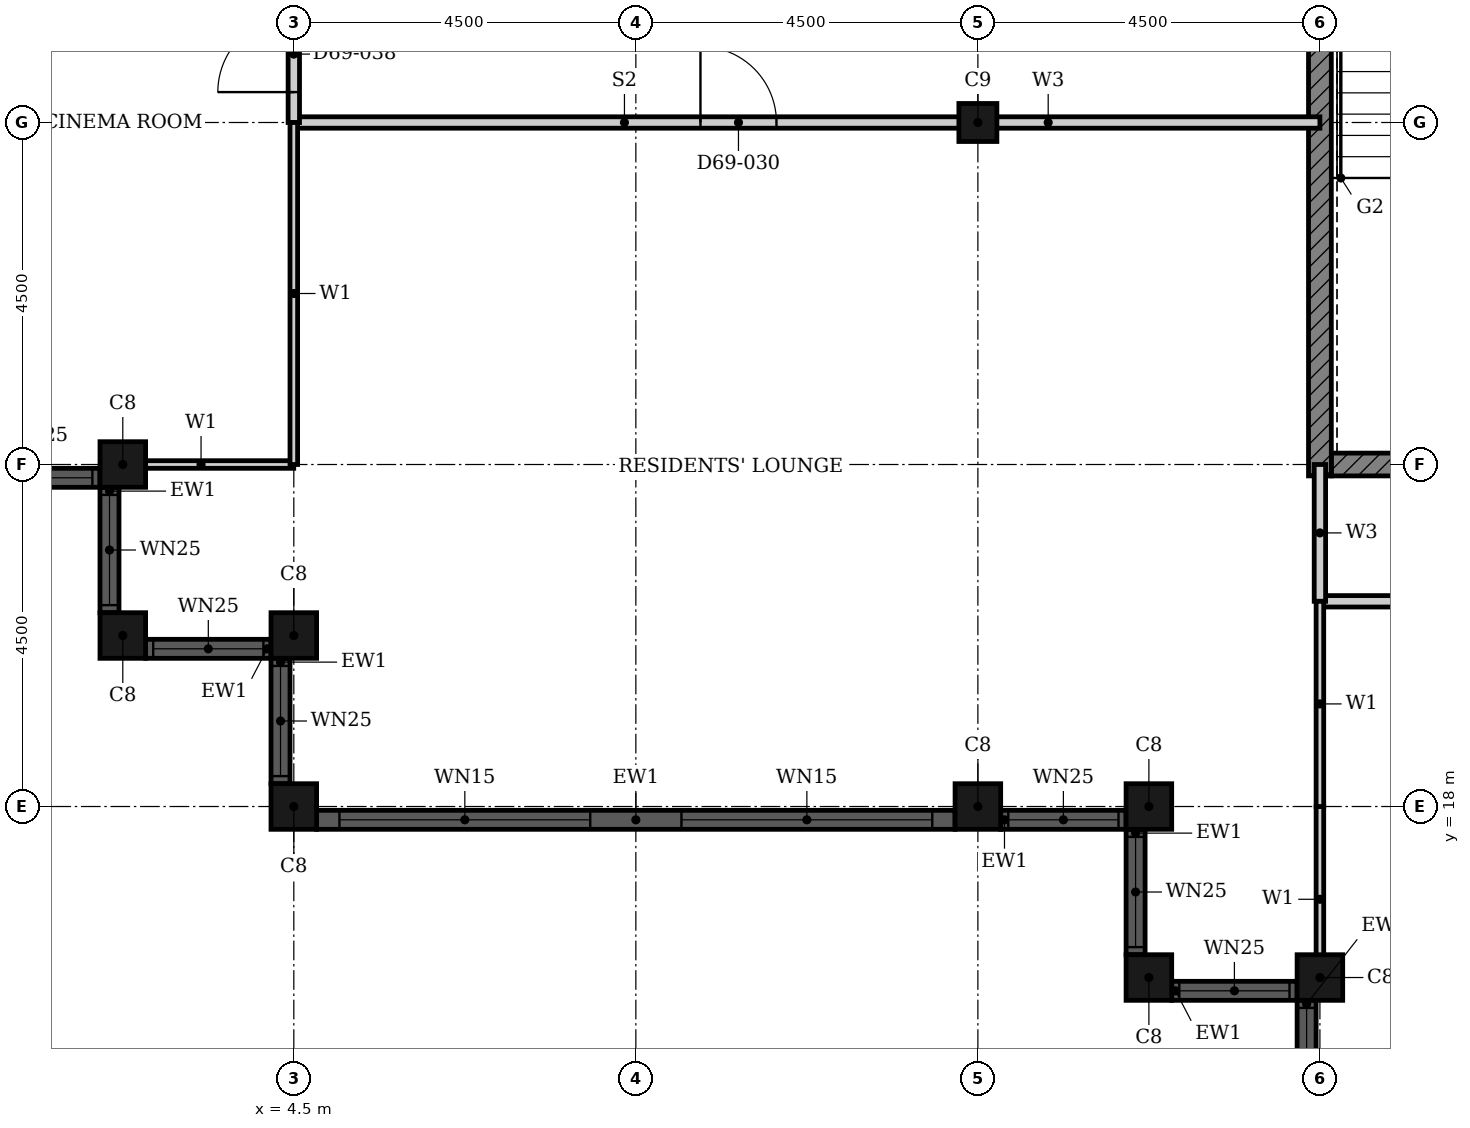
"""IFC4 building model, lengths in metres.
Left out: names, types, materials, properties, quantities, classifications, styles, units other than length and angle.
Written with IfcOpenShell. Run it as: python <this file> out.ifc"""

import sys

from ifc_helpers import new_model, si_unit, direction, frame, frame_2d, origin, origin_2d, place, context, subcontext, project, spatial, rectangle, hollow_rectangle, extrude, element, fill, save


model = new_model("IFC4")
c1 = context("Model", 3, precision=1e-05, world=origin(), true_north=direction((0.0, 1.0)))
c2 = subcontext(c1, "Body", "Model", "MODEL_VIEW")
j1 = project(units=[si_unit("LENGTHUNIT", "METRE"), si_unit("PLANEANGLEUNIT", "RADIAN")], contexts=[c1])
p1 = place(None, origin())
s1 = spatial("IfcSite", under=j1, at=p1, CompositionType="ELEMENT")
p2 = place(p1, origin())
s2 = spatial("IfcBuilding", under=s1, at=p2, CompositionType="ELEMENT")
p3 = place(p2, frame((0.0, 0.0, 271.2)))
s3 = spatial("IfcBuildingStorey", under=s2, at=p3, CompositionType="ELEMENT", Elevation=271.2)
for number, where, z_axis, x_axis in (
    (1, (15.75, 18.0, 0.0), (0.0, 0.0, 1.0), (1.0, 0.0, 0.0)),
    (2, (15.75, 15.75, 0.0), (0.0, 0.0, 1.0), (1.0, 0.0, 0.0)),
    (3, (18.0, 15.75, 0.0), (0.0, 0.0, 1.0), (1.0, 0.0, 0.0)),
    (4, (2.25, 22.5, 0.0), (0.0, 0.0, 1.0), (1.0, 0.0, 0.0)),
    (5, (2.25, 20.25, 0.0), (0.0, 0.0, 1.0), (1.0, 0.0, 0.0)),
    (6, (4.5, 20.25, 0.0), (0.0, 0.0, 1.0), (1.0, 0.0, 0.0)),
    (7, (4.5, 18.0, 0.0), (0.0, 0.0, 1.0), (1.0, 0.0, 0.0)),
    (8, (13.5, 18.0, 0.0), (0.0, 0.0, 1.0), (1.0, 0.0, 0.0)),
):
    element("IfcColumn", number, at=place(p3, frame(where, z_axis=z_axis, x_axis=x_axis)), inside=s3, PredefinedType="COLUMN", context=c2, shape_type="SweptSolid", body=[
        extrude(hollow_rectangle(XDim=0.6, YDim=0.6, WallThickness=0.02, at=origin_2d()), origin(), (0.0, 0.0, 1.0), 3.7),
    ])
p4 = place(p3, frame((13.5, 27.0, 0.0), z_axis=(0.0, 0.0, 1.0), x_axis=(1.0, 0.0, 0.0)))
e9 = element("IfcColumn", 9, at=p4, inside=s3, PredefinedType="COLUMN", context=c2, shape_type="SweptSolid", body=[
    extrude(hollow_rectangle(XDim=0.5, YDim=0.5, WallThickness=0.016, InnerFilletRadius=0.032, OuterFilletRadius=0.048, at=origin_2d()), origin(), (0.0, 0.0, 1.0), 3.7),
])
p5 = place(p3, frame((15.575, 17.7, 0.0), z_axis=(0.0, 0.0, 1.0), x_axis=(0.0, -1.0, 0.0)))
e10 = element("IfcWall", 10, at=p5, inside=s3, PredefinedType="SOLIDWALL", context=c2, shape_type="SweptSolid", body=[
    extrude(rectangle(XDim=1.65, YDim=0.25, at=frame_2d((0.825, 0.0))), origin(), (0.0, 0.0, 1.0), 3.7),
])
p6 = place(p5, frame((0.1, 0.0, 0.9)))
e11 = element("IfcOpeningElement", 11, at=p6, cuts=e10, PredefinedType="OPENING", context=c2, shape_type="SweptSolid", body=[
    extrude(rectangle(XDim=1.45, YDim=1.85, at=frame_2d((0.725, 0.925))), frame((0.0, 0.135, 0.0), z_axis=(0.0, -1.0, 0.0), x_axis=(1.0, 0.0, 0.0)), (0.0, 0.0, 1.0), 0.27),
])
p7 = place(p3, frame((16.05, 15.575, 0.0), z_axis=(0.0, 0.0, 1.0), x_axis=(1.0, 0.0, 0.0)))
e12 = element("IfcWall", 12, at=p7, inside=s3, PredefinedType="SOLIDWALL", context=c2, shape_type="SweptSolid", body=[
    extrude(rectangle(XDim=1.65, YDim=0.25, at=frame_2d((0.825, 0.0))), origin(), (0.0, 0.0, 1.0), 3.7),
])
p8 = place(p7, frame((0.1, 0.0, 0.9)))
e13 = element("IfcOpeningElement", 13, at=p8, cuts=e12, PredefinedType="OPENING", context=c2, shape_type="SweptSolid", body=[
    extrude(rectangle(XDim=1.45, YDim=1.85, at=frame_2d((0.725, 0.925))), frame((0.0, 0.135, 0.0), z_axis=(0.0, -1.0, 0.0), x_axis=(1.0, 0.0, 0.0)), (0.0, 0.0, 1.0), 0.27),
])
p9 = place(p3, frame((17.825, 15.45, 0.0), z_axis=(0.0, 0.0, 1.0), x_axis=(0.0, -1.0, 0.0)))
e14 = element("IfcWall", 14, at=p9, inside=s3, PredefinedType="SOLIDWALL", context=c2, shape_type="SweptSolid", body=[
    extrude(rectangle(XDim=1.65, YDim=0.25, at=frame_2d((0.825, 0.0))), origin(), (0.0, 0.0, 1.0), 3.7),
])
p10 = place(p9, frame((0.1, 0.0, 0.9)))
e15 = element("IfcOpeningElement", 15, at=p10, cuts=e14, PredefinedType="OPENING", context=c2, shape_type="SweptSolid", body=[
    extrude(rectangle(XDim=1.45, YDim=1.85, at=frame_2d((0.725, 0.925))), frame((0.0, 0.135, 0.0), z_axis=(0.0, -1.0, 0.0), x_axis=(1.0, 0.0, 0.0)), (0.0, 0.0, 1.0), 0.27),
])
p11 = place(p3, frame((0.3, 22.325, 0.0), z_axis=(0.0, 0.0, 1.0), x_axis=(1.0, 0.0, 0.0)))
e16 = element("IfcWall", 16, at=p11, inside=s3, PredefinedType="SOLIDWALL", context=c2, shape_type="SweptSolid", body=[
    extrude(rectangle(XDim=1.65, YDim=0.25, at=frame_2d((0.825, 0.0))), origin(), (0.0, 0.0, 1.0), 3.7),
])
p12 = place(p11, frame((0.1, 0.0, 0.9)))
e17 = element("IfcOpeningElement", 17, at=p12, cuts=e16, PredefinedType="OPENING", context=c2, shape_type="SweptSolid", body=[
    extrude(rectangle(XDim=1.45, YDim=1.85, at=frame_2d((0.725, 0.925))), frame((0.0, 0.135, 0.0), z_axis=(0.0, -1.0, 0.0), x_axis=(1.0, 0.0, 0.0)), (0.0, 0.0, 1.0), 0.27),
])
p13 = place(p3, frame((2.075, 22.2, 0.0), z_axis=(0.0, 0.0, 1.0), x_axis=(0.0, -1.0, 0.0)))
e18 = element("IfcWall", 18, at=p13, inside=s3, PredefinedType="SOLIDWALL", context=c2, shape_type="SweptSolid", body=[
    extrude(rectangle(XDim=1.65, YDim=0.25, at=frame_2d((0.825, 0.0))), origin(), (0.0, 0.0, 1.0), 3.7),
])
p14 = place(p13, frame((0.1, 0.0, 0.9)))
e19 = element("IfcOpeningElement", 19, at=p14, cuts=e18, PredefinedType="OPENING", context=c2, shape_type="SweptSolid", body=[
    extrude(rectangle(XDim=1.45, YDim=1.85, at=frame_2d((0.725, 0.925))), frame((0.0, 0.135, 0.0), z_axis=(0.0, -1.0, 0.0), x_axis=(1.0, 0.0, 0.0)), (0.0, 0.0, 1.0), 0.27),
])
p15 = place(p3, frame((2.55, 20.075, 0.0), z_axis=(0.0, 0.0, 1.0), x_axis=(1.0, 0.0, 0.0)))
e20 = element("IfcWall", 20, at=p15, inside=s3, PredefinedType="SOLIDWALL", context=c2, shape_type="SweptSolid", body=[
    extrude(rectangle(XDim=1.65, YDim=0.25, at=frame_2d((0.825, 0.0))), origin(), (0.0, 0.0, 1.0), 3.7),
])
p16 = place(p15, frame((0.1, 0.0, 0.9)))
e21 = element("IfcOpeningElement", 21, at=p16, cuts=e20, PredefinedType="OPENING", context=c2, shape_type="SweptSolid", body=[
    extrude(rectangle(XDim=1.45, YDim=1.85, at=frame_2d((0.725, 0.925))), frame((0.0, 0.135, 0.0), z_axis=(0.0, -1.0, 0.0), x_axis=(1.0, 0.0, 0.0)), (0.0, 0.0, 1.0), 0.27),
])
p17 = place(p3, frame((4.325, 19.95, 0.0), z_axis=(0.0, 0.0, 1.0), x_axis=(0.0, -1.0, 0.0)))
e22 = element("IfcWall", 22, at=p17, inside=s3, PredefinedType="SOLIDWALL", context=c2, shape_type="SweptSolid", body=[
    extrude(rectangle(XDim=1.65, YDim=0.25, at=frame_2d((0.825, 0.0))), origin(), (0.0, 0.0, 1.0), 3.7),
])
p18 = place(p17, frame((0.1, 0.0, 0.9)))
e23 = element("IfcOpeningElement", 23, at=p18, cuts=e22, PredefinedType="OPENING", context=c2, shape_type="SweptSolid", body=[
    extrude(rectangle(XDim=1.45, YDim=1.85, at=frame_2d((0.725, 0.925))), frame((0.0, 0.135, 0.0), z_axis=(0.0, -1.0, 0.0), x_axis=(1.0, 0.0, 0.0)), (0.0, 0.0, 1.0), 0.27),
])
p19 = place(p3, frame((4.8, 17.825, 0.0), z_axis=(0.0, 0.0, 1.0), x_axis=(1.0, 0.0, 0.0)))
e24 = element("IfcWall", 24, at=p19, inside=s3, PredefinedType="SOLIDWALL", context=c2, shape_type="SweptSolid", body=[
    extrude(rectangle(XDim=8.4, YDim=0.25, at=frame_2d((4.2, 0.0))), origin(), (0.0, 0.0, 1.0), 3.7),
])
p20 = place(p19, frame((0.3, 0.0, 0.45)))
e25 = element("IfcOpeningElement", 25, at=p20, cuts=e24, PredefinedType="OPENING", context=c2, shape_type="SweptSolid", body=[
    extrude(rectangle(XDim=3.3, YDim=2.3, at=frame_2d((1.65, 1.15))), frame((0.0, 0.135, 0.0), z_axis=(0.0, -1.0, 0.0), x_axis=(1.0, 0.0, 0.0)), (0.0, 0.0, 1.0), 0.27),
])
p21 = place(p19, frame((4.8, 0.0, 0.45)))
e26 = element("IfcOpeningElement", 26, at=p21, cuts=e24, PredefinedType="OPENING", context=c2, shape_type="SweptSolid", body=[
    extrude(rectangle(XDim=3.3, YDim=2.3, at=frame_2d((1.65, 1.15))), frame((0.0, 0.135, 0.0), z_axis=(0.0, -1.0, 0.0), x_axis=(1.0, 0.0, 0.0)), (0.0, 0.0, 1.0), 0.27),
])
p22 = place(p3, frame((13.8, 17.825, 0.0), z_axis=(0.0, 0.0, 1.0), x_axis=(1.0, 0.0, 0.0)))
e27 = element("IfcWall", 27, at=p22, inside=s3, PredefinedType="SOLIDWALL", context=c2, shape_type="SweptSolid", body=[
    extrude(rectangle(XDim=1.65, YDim=0.25, at=frame_2d((0.825, 0.0))), origin(), (0.0, 0.0, 1.0), 3.7),
])
p23 = place(p22, frame((0.1, 0.0, 0.9)))
e28 = element("IfcOpeningElement", 28, at=p23, cuts=e27, PredefinedType="OPENING", context=c2, shape_type="SweptSolid", body=[
    extrude(rectangle(XDim=1.45, YDim=1.85, at=frame_2d((0.725, 0.925))), frame((0.0, 0.135, 0.0), z_axis=(0.0, -1.0, 0.0), x_axis=(1.0, 0.0, 0.0)), (0.0, 0.0, 1.0), 0.27),
])
p24 = place(p3, frame((18.15, 22.5, 0.0), z_axis=(0.0, 0.0, 1.0), x_axis=(1.0, 0.0, 0.0)))
e29 = element("IfcWall", 29, at=p24, inside=s3, PredefinedType="SHEAR", context=c2, shape_type="SweptSolid", body=[
    extrude(rectangle(XDim=4.225, YDim=0.3, at=frame_2d((2.113, 0.0))), origin(), (0.0, 0.0, 1.0), 3.4),
])
p25 = place(p3, frame((18.0, 22.35, 0.0), z_axis=(0.0, 0.0, 1.0), x_axis=(0.0, 1.0, 0.0)))
e30 = element("IfcWall", 30, at=p25, inside=s3, PredefinedType="SHEAR", context=c2, shape_type="SweptSolid", body=[
    extrude(rectangle(XDim=9.3, YDim=0.3, at=frame_2d((4.65, 0.0))), origin(), (0.0, 0.0, 1.0), 3.4),
])
p26 = place(p3, frame((18.0, 20.7, 0.0), z_axis=(0.0, 0.0, 1.0), x_axis=(1.0, 0.0, 0.0)))
e31 = element("IfcWall", 31, at=p26, inside=s3, PredefinedType="PARTITIONING", context=c2, shape_type="SweptSolid", body=[
    extrude(rectangle(XDim=13.5, YDim=0.15, at=frame_2d((6.75, 0.0))), origin(), (0.0, 0.0, 1.0), 3.4),
])
p27 = place(p26, frame((6.25, 0.0, 0.0)))
e32 = element("IfcOpeningElement", 32, at=p27, cuts=e31, PredefinedType="OPENING", context=c2, shape_type="SweptSolid", body=[
    extrude(rectangle(XDim=1.0, YDim=2.1, at=frame_2d((0.5, 1.05))), frame((0.0, 0.085, 0.0), z_axis=(0.0, -1.0, 0.0), x_axis=(1.0, 0.0, 0.0)), (0.0, 0.0, 1.0), 0.17),
])
p28 = place(p3, frame((4.5, 27.0, 0.0), z_axis=(0.0, 0.0, 1.0), x_axis=(1.0, 0.0, 0.0)))
e33 = element("IfcWall", 33, at=p28, inside=s3, PredefinedType="PARTITIONING", context=c2, shape_type="SweptSolid", body=[
    extrude(rectangle(XDim=13.5, YDim=0.15, at=frame_2d((6.75, 0.0))), origin(), (0.0, 0.0, 1.0), 2.68),
])
p29 = place(p28, frame((5.35, 0.0, 0.0)))
e34 = element("IfcOpeningElement", 34, at=p29, cuts=e33, PredefinedType="OPENING", context=c2, shape_type="SweptSolid", body=[
    extrude(rectangle(XDim=1.0, YDim=2.1, at=frame_2d((0.5, 1.05))), frame((0.0, 0.085, 0.0), z_axis=(0.0, -1.0, 0.0), x_axis=(1.0, 0.0, 0.0)), (0.0, 0.0, 1.0), 0.17),
])
p30 = place(p3, frame((18.0, 20.7, 0.0), z_axis=(0.0, 0.0, 1.0), x_axis=(0.0, 1.0, 0.0)))
e35 = element("IfcWall", 35, at=p30, inside=s3, PredefinedType="PARTITIONING", context=c2, shape_type="SweptSolid", body=[
    extrude(rectangle(XDim=1.8, YDim=0.15, at=frame_2d((0.9, 0.0))), origin(), (0.0, 0.0, 1.0), 3.4),
])
p31 = place(p3, frame((4.5, 27.0, 0.0), z_axis=(0.0, 0.0, 1.0), x_axis=(0.0, 1.0, 0.0)))
e36 = element("IfcWall", 36, at=p31, inside=s3, PredefinedType="PARTITIONING", context=c2, shape_type="SweptSolid", body=[
    extrude(rectangle(XDim=1.8, YDim=0.15, at=frame_2d((0.9, 0.0))), origin(), (0.0, 0.0, 1.0), 3.4),
])
p32 = place(p31, frame((0.4, 0.0, 0.0)))
e37 = element("IfcOpeningElement", 37, at=p32, cuts=e36, PredefinedType="OPENING", context=c2, shape_type="SweptSolid", body=[
    extrude(rectangle(XDim=1.0, YDim=2.1, at=frame_2d((0.5, 1.05))), frame((0.0, 0.085, 0.0), z_axis=(0.0, -1.0, 0.0), x_axis=(1.0, 0.0, 0.0)), (0.0, 0.0, 1.0), 0.17),
])
p33 = place(p3, frame((2.06, 22.5, 0.0), z_axis=(0.0, 0.0, 1.0), x_axis=(1.0, 0.0, 0.0)))
e38 = element("IfcWall", 38, at=p33, inside=s3, PredefinedType="PARTITIONING", context=c2, shape_type="SweptSolid", body=[
    extrude(rectangle(XDim=2.439, YDim=0.1, at=frame_2d((1.219, 0.0))), origin(), (0.0, 0.0, 1.0), 2.68),
])
p34 = place(p3, frame((18.0, 15.56, 0.0), z_axis=(0.0, 0.0, 1.0), x_axis=(0.0, 1.0, 0.0)))
e39 = element("IfcWall", 39, at=p34, inside=s3, PredefinedType="PARTITIONING", context=c2, shape_type="SweptSolid", body=[
    extrude(rectangle(XDim=2.439, YDim=0.1, at=frame_2d((1.219, 0.0))), origin(), (0.0, 0.0, 1.0), 3.4),
])
p35 = place(p3, frame((18.0, 18.0, 0.0), z_axis=(0.0, 0.0, 1.0), x_axis=(0.0, 1.0, 0.0)))
e40 = element("IfcWall", 40, at=p35, inside=s3, PredefinedType="PARTITIONING", context=c2, shape_type="SweptSolid", body=[
    extrude(rectangle(XDim=2.7, YDim=0.1, at=frame_2d((1.35, 0.0))), origin(), (0.0, 0.0, 1.0), 3.4),
])
p36 = place(p3, frame((4.5, 22.5, 0.0), z_axis=(0.0, 0.0, 1.0), x_axis=(0.0, 1.0, 0.0)))
e41 = element("IfcWall", 41, at=p36, inside=s3, PredefinedType="PARTITIONING", context=c2, shape_type="SweptSolid", body=[
    extrude(rectangle(XDim=4.5, YDim=0.1, at=frame_2d((2.25, 0.0))), origin(), (0.0, 0.0, 1.0), 3.4),
])
p37 = place(p6, origin())
e42 = element("IfcWindow", 42, at=p37, inside=s3, PartitioningType="SINGLE_PANEL", PredefinedType="WINDOW", context=c2, shape_type="SweptSolid", body=[
    extrude(rectangle(XDim=1.45, YDim=1.85, at=frame_2d((0.725, 0.925))), frame((0.0, 0.03, 0.0), z_axis=(0.0, -1.0, 0.0), x_axis=(1.0, 0.0, 0.0)), (0.0, 0.0, 1.0), 0.06),
])
fill(e11, e42)
p38 = place(p8, origin())
e43 = element("IfcWindow", 43, at=p38, inside=s3, PartitioningType="SINGLE_PANEL", PredefinedType="WINDOW", context=c2, shape_type="SweptSolid", body=[
    extrude(rectangle(XDim=1.45, YDim=1.85, at=frame_2d((0.725, 0.925))), frame((0.0, 0.03, 0.0), z_axis=(0.0, -1.0, 0.0), x_axis=(1.0, 0.0, 0.0)), (0.0, 0.0, 1.0), 0.06),
])
fill(e13, e43)
p39 = place(p10, origin())
e44 = element("IfcWindow", 44, at=p39, inside=s3, PartitioningType="SINGLE_PANEL", PredefinedType="WINDOW", context=c2, shape_type="SweptSolid", body=[
    extrude(rectangle(XDim=1.45, YDim=1.85, at=frame_2d((0.725, 0.925))), frame((0.0, 0.03, 0.0), z_axis=(0.0, -1.0, 0.0), x_axis=(1.0, 0.0, 0.0)), (0.0, 0.0, 1.0), 0.06),
])
fill(e15, e44)
p40 = place(p12, origin())
e45 = element("IfcWindow", 45, at=p40, inside=s3, PartitioningType="SINGLE_PANEL", PredefinedType="WINDOW", context=c2, shape_type="SweptSolid", body=[
    extrude(rectangle(XDim=1.45, YDim=1.85, at=frame_2d((0.725, 0.925))), frame((0.0, 0.03, 0.0), z_axis=(0.0, -1.0, 0.0), x_axis=(1.0, 0.0, 0.0)), (0.0, 0.0, 1.0), 0.06),
])
fill(e17, e45)
p41 = place(p14, origin())
e46 = element("IfcWindow", 46, at=p41, inside=s3, PartitioningType="SINGLE_PANEL", PredefinedType="WINDOW", context=c2, shape_type="SweptSolid", body=[
    extrude(rectangle(XDim=1.45, YDim=1.85, at=frame_2d((0.725, 0.925))), frame((0.0, 0.03, 0.0), z_axis=(0.0, -1.0, 0.0), x_axis=(1.0, 0.0, 0.0)), (0.0, 0.0, 1.0), 0.06),
])
fill(e19, e46)
p42 = place(p16, origin())
e47 = element("IfcWindow", 47, at=p42, inside=s3, PartitioningType="SINGLE_PANEL", PredefinedType="WINDOW", context=c2, shape_type="SweptSolid", body=[
    extrude(rectangle(XDim=1.45, YDim=1.85, at=frame_2d((0.725, 0.925))), frame((0.0, 0.03, 0.0), z_axis=(0.0, -1.0, 0.0), x_axis=(1.0, 0.0, 0.0)), (0.0, 0.0, 1.0), 0.06),
])
fill(e21, e47)
p43 = place(p18, origin())
e48 = element("IfcWindow", 48, at=p43, inside=s3, PartitioningType="SINGLE_PANEL", PredefinedType="WINDOW", context=c2, shape_type="SweptSolid", body=[
    extrude(rectangle(XDim=1.45, YDim=1.85, at=frame_2d((0.725, 0.925))), frame((0.0, 0.03, 0.0), z_axis=(0.0, -1.0, 0.0), x_axis=(1.0, 0.0, 0.0)), (0.0, 0.0, 1.0), 0.06),
])
fill(e23, e48)
p44 = place(p20, origin())
e49 = element("IfcWindow", 49, at=p44, inside=s3, PartitioningType="SINGLE_PANEL", PredefinedType="WINDOW", context=c2, shape_type="SweptSolid", body=[
    extrude(rectangle(XDim=3.3, YDim=2.3, at=frame_2d((1.65, 1.15))), frame((0.0, 0.03, 0.0), z_axis=(0.0, -1.0, 0.0), x_axis=(1.0, 0.0, 0.0)), (0.0, 0.0, 1.0), 0.06),
])
fill(e25, e49)
p45 = place(p21, origin())
e50 = element("IfcWindow", 50, at=p45, inside=s3, PartitioningType="SINGLE_PANEL", PredefinedType="WINDOW", context=c2, shape_type="SweptSolid", body=[
    extrude(rectangle(XDim=3.3, YDim=2.3, at=frame_2d((1.65, 1.15))), frame((0.0, 0.03, 0.0), z_axis=(0.0, -1.0, 0.0), x_axis=(1.0, 0.0, 0.0)), (0.0, 0.0, 1.0), 0.06),
])
fill(e26, e50)
p46 = place(p23, origin())
e51 = element("IfcWindow", 51, at=p46, inside=s3, PartitioningType="SINGLE_PANEL", PredefinedType="WINDOW", context=c2, shape_type="SweptSolid", body=[
    extrude(rectangle(XDim=1.45, YDim=1.85, at=frame_2d((0.725, 0.925))), frame((0.0, 0.03, 0.0), z_axis=(0.0, -1.0, 0.0), x_axis=(1.0, 0.0, 0.0)), (0.0, 0.0, 1.0), 0.06),
])
fill(e28, e51)
p47 = place(p29, origin())
e52 = element("IfcDoor", 52, at=p47, inside=s3, OperationType="SINGLE_SWING_LEFT", PredefinedType="DOOR", context=c2, shape_type="SweptSolid", body=[
    extrude(rectangle(XDim=1.0, YDim=2.1, at=frame_2d((0.5, 1.05))), frame((0.0, 0.025, 0.0), z_axis=(0.0, -1.0, 0.0), x_axis=(1.0, 0.0, 0.0)), (0.0, 0.0, 1.0), 0.05),
])
fill(e34, e52)
p48 = place(p32, origin())
e53 = element("IfcDoor", 53, at=p48, inside=s3, OperationType="SINGLE_SWING_LEFT", PredefinedType="DOOR", context=c2, shape_type="SweptSolid", body=[
    extrude(rectangle(XDim=1.0, YDim=2.1, at=frame_2d((0.5, 1.05))), frame((0.0, 0.025, 0.0), z_axis=(0.0, -1.0, 0.0), x_axis=(1.0, 0.0, 0.0)), (0.0, 0.0, 1.0), 0.05),
])
fill(e37, e53)
save(model, sys.argv[1])
